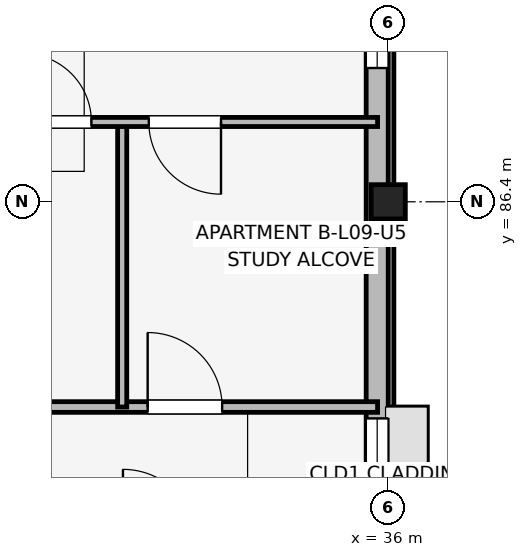
"""IFC4 building model, lengths in metres.
Left out: names, types, materials, properties, quantities, classifications, styles, units other than length and angle.
Written with IfcOpenShell. Run it as: python <this file> out.ifc"""

import sys

from ifc_helpers import new_model, si_unit, direction, frame, frame_2d, origin, origin_2d, place, context, subcontext, project, spatial, rectangle, extrude, element, fill, save


model = new_model("IFC4")
c1 = context("Model", 3, precision=1e-05, world=origin(), true_north=direction((0.0, 1.0)))
c2 = subcontext(c1, "Body", "Model", "MODEL_VIEW")
j1 = project(units=[si_unit("LENGTHUNIT", "METRE"), si_unit("PLANEANGLEUNIT", "RADIAN")], contexts=[c1])
p1 = place(None, origin())
s1 = spatial("IfcSite", under=j1, at=p1, CompositionType="ELEMENT")
p2 = place(p1, origin())
s2 = spatial("IfcBuilding", under=s1, at=p2, CompositionType="ELEMENT")
p3 = place(p2, frame((0.0, 0.0, 30.75)))
s3 = spatial("IfcBuildingStorey", under=s2, at=p3, CompositionType="ELEMENT", Elevation=30.75)
p4 = place(p3, frame((36.0, 86.4, 0.0), z_axis=(0.0, 0.0, 1.0), x_axis=(1.0, 0.0, 0.0)))
e1 = element("IfcColumn", 1, at=p4, inside=s3, PredefinedType="COLUMN", context=c2, shape_type="SweptSolid", body=[
    extrude(rectangle(XDim=0.45, YDim=0.45, at=origin_2d()), origin(), (0.0, 0.0, 1.0), 3.15),
])
p5 = place(p3, frame((35.855, 75.2, 0.0), z_axis=(0.0, 0.0, 1.0), x_axis=(0.0, 1.0, 0.0)))
e2 = element("IfcWall", 2, at=p5, inside=s3, PredefinedType="SOLIDWALL", context=c2, shape_type="SweptSolid", body=[
    extrude(rectangle(XDim=15.2, YDim=0.29, at=frame_2d((7.6, 0.0))), origin(), (0.0, 0.0, 1.0), 2.48),
])
p6 = place(p5, frame((6.85, 0.0, 1.05)))
e3 = element("IfcOpeningElement", 3, at=p6, cuts=e2, PredefinedType="OPENING", context=c2, shape_type="SweptSolid", body=[
    extrude(rectangle(XDim=1.5, YDim=1.15, at=frame_2d((0.75, 0.575))), frame((0.0, 0.155, 0.0), z_axis=(0.0, -1.0, 0.0), x_axis=(1.0, 0.0, 0.0)), (0.0, 0.0, 1.0), 0.31),
])
p7 = place(p5, frame((12.96, 0.0, 0.75)))
e4 = element("IfcOpeningElement", 4, at=p7, cuts=e2, PredefinedType="OPENING", context=c2, shape_type="SweptSolid", body=[
    extrude(rectangle(XDim=1.3, YDim=1.55, at=frame_2d((0.65, 0.775))), frame((0.0, 0.155, 0.0), z_axis=(0.0, -1.0, 0.0), x_axis=(1.0, 0.0, 0.0)), (0.0, 0.0, 1.0), 0.31),
])
p8 = place(p3, frame((28.94, 83.7, 0.0), z_axis=(0.0, 0.0, 1.0), x_axis=(1.0, 0.0, 0.0)))
e5 = element("IfcWall", 5, at=p8, inside=s3, PredefinedType="PARTITIONING", context=c2, shape_type="SweptSolid", body=[
    extrude(rectangle(XDim=6.92, YDim=0.14, at=frame_2d((3.46, 0.0))), origin(), (0.0, 0.0, 1.0), 2.38),
])
p9 = place(p8, frame((3.895, 0.0, 0.0)))
e6 = element("IfcOpeningElement", 6, at=p9, cuts=e5, PredefinedType="OPENING", context=c2, shape_type="SweptSolid", body=[
    extrude(rectangle(XDim=0.98, YDim=2.1, at=frame_2d((0.49, 1.05))), frame((0.0, 0.08, 0.0), z_axis=(0.0, -1.0, 0.0), x_axis=(1.0, 0.0, 0.0)), (0.0, 0.0, 1.0), 0.16),
])
p10 = place(p3, frame((32.5, 83.7, 0.0), z_axis=(0.0, 0.0, 1.0), x_axis=(0.0, 1.0, 0.0)))
e7 = element("IfcWall", 7, at=p10, inside=s3, PredefinedType="PARTITIONING", context=c2, shape_type="SweptSolid", body=[
    extrude(rectangle(XDim=3.75, YDim=0.12, at=frame_2d((1.875, 0.0))), origin(), (0.0, 0.0, 1.0), 2.38),
])
p11 = place(p3, frame((28.94, 87.45, 0.0), z_axis=(0.0, 0.0, 1.0), x_axis=(1.0, 0.0, 0.0)))
e8 = element("IfcWall", 8, at=p11, inside=s3, PredefinedType="PARTITIONING", context=c2, shape_type="SweptSolid", body=[
    extrude(rectangle(XDim=6.92, YDim=0.12, at=frame_2d((3.46, 0.0))), origin(), (0.0, 0.0, 1.0), 2.38),
])
p12 = place(p11, frame((1.35, 0.0, 0.0), z_axis=(0.0, 0.0, 1.0), x_axis=(-1.0, 0.0, 0.0)))
e9 = element("IfcOpeningElement", 9, at=p12, cuts=e8, PredefinedType="OPENING", context=c2, shape_type="SweptSolid", body=[
    extrude(rectangle(XDim=0.85, YDim=2.08, at=frame_2d((0.425, 1.04))), frame((0.0, 0.07, 0.0), z_axis=(0.0, -1.0, 0.0), x_axis=(1.0, 0.0, 0.0)), (0.0, 0.0, 1.0), 0.14),
])
p13 = place(p11, frame((2.255, 0.0, 0.0)))
e10 = element("IfcOpeningElement", 10, at=p13, cuts=e8, PredefinedType="OPENING", context=c2, shape_type="SweptSolid", body=[
    extrude(rectangle(XDim=0.9, YDim=2.08, at=frame_2d((0.45, 1.04))), frame((0.0, 0.07, 0.0), z_axis=(0.0, -1.0, 0.0), x_axis=(1.0, 0.0, 0.0)), (0.0, 0.0, 1.0), 0.14),
])
p14 = place(p11, frame((4.86, 0.0, 0.0), z_axis=(0.0, 0.0, 1.0), x_axis=(-1.0, 0.0, 0.0)))
e11 = element("IfcOpeningElement", 11, at=p14, cuts=e8, PredefinedType="OPENING", context=c2, shape_type="SweptSolid", body=[
    extrude(rectangle(XDim=0.95, YDim=2.08, at=frame_2d((0.475, 1.04))), frame((0.0, 0.07, 0.0), z_axis=(0.0, -1.0, 0.0), x_axis=(1.0, 0.0, 0.0)), (0.0, 0.0, 1.0), 0.14),
])
p15 = place(p6, origin())
e12 = element("IfcWindow", 12, at=p15, inside=s3, PartitioningType="SINGLE_PANEL", PredefinedType="WINDOW", context=c2, shape_type="SweptSolid", body=[
    extrude(rectangle(XDim=1.5, YDim=1.15, at=frame_2d((0.75, 0.575))), frame((0.0, 0.03, 0.0), z_axis=(0.0, -1.0, 0.0), x_axis=(1.0, 0.0, 0.0)), (0.0, 0.0, 1.0), 0.06),
])
fill(e3, e12)
p16 = place(p7, origin())
e13 = element("IfcWindow", 13, at=p16, inside=s3, PartitioningType="SINGLE_PANEL", PredefinedType="WINDOW", context=c2, shape_type="SweptSolid", body=[
    extrude(rectangle(XDim=1.3, YDim=1.55, at=frame_2d((0.65, 0.775))), frame((0.0, 0.03, 0.0), z_axis=(0.0, -1.0, 0.0), x_axis=(1.0, 0.0, 0.0)), (0.0, 0.0, 1.0), 0.06),
])
fill(e4, e13)
p17 = place(p9, origin())
e14 = element("IfcDoor", 14, at=p17, inside=s3, OperationType="SINGLE_SWING_LEFT", PredefinedType="DOOR", context=c2, shape_type="SweptSolid", body=[
    extrude(rectangle(XDim=0.98, YDim=2.1, at=frame_2d((0.49, 1.05))), frame((0.0, 0.025, 0.0), z_axis=(0.0, -1.0, 0.0), x_axis=(1.0, 0.0, 0.0)), (0.0, 0.0, 1.0), 0.05),
])
fill(e6, e14)
p18 = place(p13, origin())
e15 = element("IfcDoor", 15, at=p18, inside=s3, OperationType="SINGLE_SWING_LEFT", PredefinedType="DOOR", context=c2, shape_type="SweptSolid", body=[
    extrude(rectangle(XDim=0.9, YDim=2.08, at=frame_2d((0.45, 1.04))), frame((0.0, 0.025, 0.0), z_axis=(0.0, -1.0, 0.0), x_axis=(1.0, 0.0, 0.0)), (0.0, 0.0, 1.0), 0.05),
])
fill(e10, e15)
p19 = place(p14, origin())
e16 = element("IfcDoor", 16, at=p19, inside=s3, OperationType="SINGLE_SWING_RIGHT", PredefinedType="DOOR", context=c2, shape_type="SweptSolid", body=[
    extrude(rectangle(XDim=0.95, YDim=2.08, at=frame_2d((0.475, 1.04))), frame((0.0, 0.025, 0.0), z_axis=(0.0, -1.0, 0.0), x_axis=(1.0, 0.0, 0.0)), (0.0, 0.0, 1.0), 0.05),
])
fill(e11, e16)
save(model, sys.argv[1])
